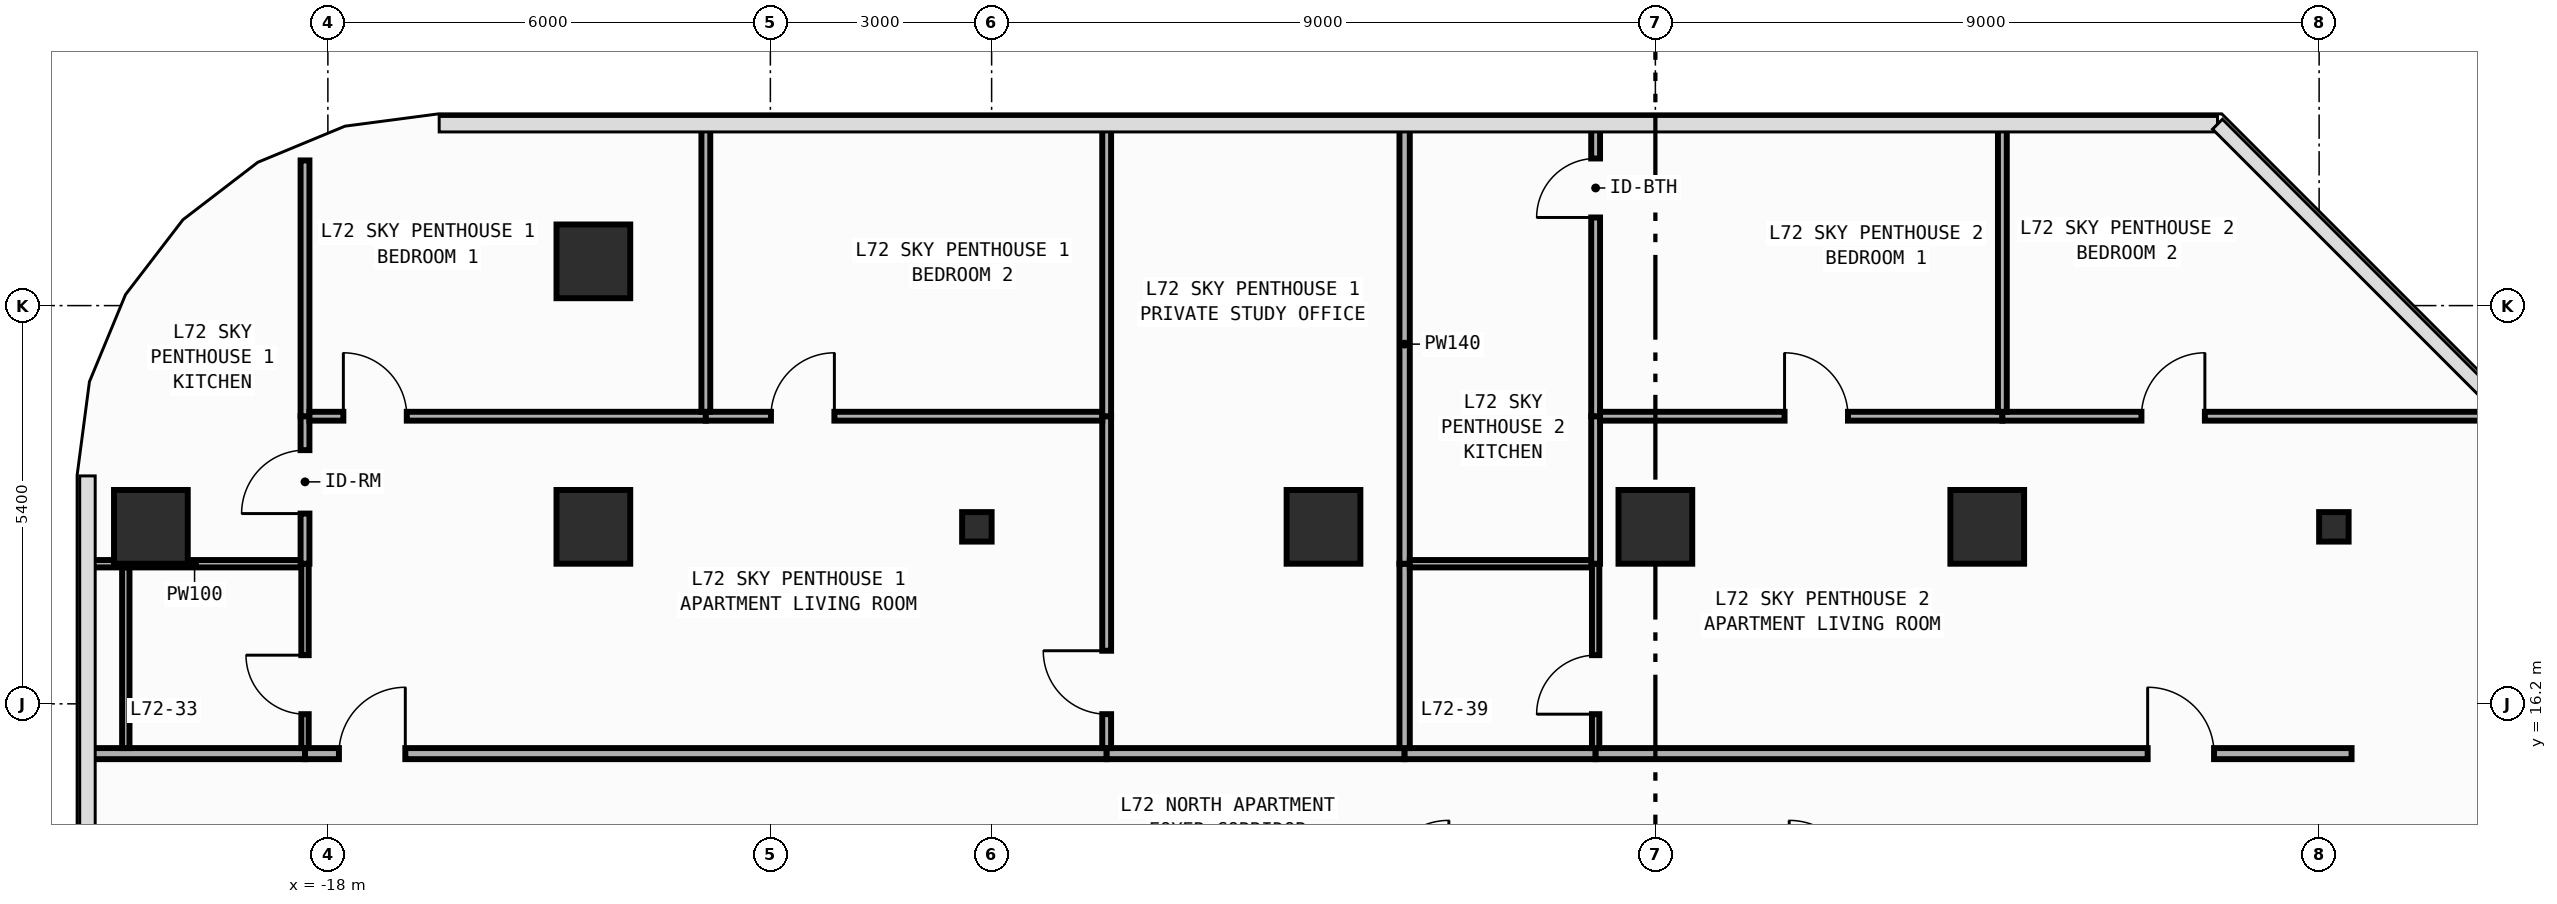
"""IFC4 building model, lengths in metres.
Left out: names, types, materials, properties, quantities, classifications, styles, units other than length and angle.
Written with IfcOpenShell. Run it as: python <this file> out.ifc"""

import sys

from ifc_helpers import new_model, si_unit, direction, frame, frame_2d, origin, origin_2d, place, context, subcontext, project, spatial, rectangle, circle, i_section, extrude, element, fill, save


model = new_model("IFC4")
c1 = context("Model", 3, precision=1e-05, world=origin(), true_north=direction((0.0, 1.0)))
c2 = subcontext(c1, "Body", "Model", "MODEL_VIEW")
j1 = project(units=[si_unit("LENGTHUNIT", "METRE"), si_unit("PLANEANGLEUNIT", "RADIAN")], contexts=[c1])
p1 = place(None, origin())
s1 = spatial("IfcSite", under=j1, at=p1, CompositionType="ELEMENT")
p2 = place(p1, origin())
s2 = spatial("IfcBuilding", under=s1, at=p2, CompositionType="ELEMENT")
p3 = place(p2, frame((0.0, 0.0, 300.4)))
s3 = spatial("IfcBuildingStorey", under=s2, at=p3, CompositionType="ELEMENT", Elevation=300.4)
for number, where, z_axis, x_axis in (
    (1, (-9.2, 18.6, 0.0), (0.0, 0.0, 1.0), (1.0, 0.0, 0.0)),
    (2, (9.2, 18.6, 0.0), (0.0, 0.0, 1.0), (1.0, 0.0, 0.0)),
):
    element("IfcColumn", number, at=place(p3, frame(where, z_axis=z_axis, x_axis=x_axis)), inside=s3, PredefinedType="COLUMN", context=c2, shape_type="SweptSolid", body=[
        extrude(i_section(OverallWidth=0.4, OverallDepth=0.4, WebThickness=0.013, FlangeThickness=0.021, FilletRadius=0.022, at=origin_2d()), origin(), (0.0, 0.0, 1.0), 3.8),
    ])
for number, where, z_axis, x_axis in (
    (3, (-20.4, 18.6, 0.0), (0.0, 0.0, 1.0), (1.0, 0.0, 0.0)),
    (4, (-14.4, 18.6, 0.0), (0.0, 0.0, 1.0), (1.0, 0.0, 0.0)),
    (5, (-4.5, 18.6, 0.0), (0.0, 0.0, 1.0), (1.0, 0.0, 0.0)),
    (6, (0.0, 18.6, 0.0), (0.0, 0.0, 1.0), (1.0, 0.0, 0.0)),
    (7, (4.5, 18.6, 0.0), (0.0, 0.0, 1.0), (1.0, 0.0, 0.0)),
    (8, (-14.4, 22.2, 0.0), (0.0, 0.0, 1.0), (1.0, 0.0, 0.0)),
):
    element("IfcColumn", number, at=place(p3, frame(where, z_axis=z_axis, x_axis=x_axis)), inside=s3, PredefinedType="COLUMN", context=c2, shape_type="SweptSolid", body=[
        extrude(circle(Radius=0.5, at=origin_2d()), origin(), (0.0, 0.0, 1.0), 3.8),
    ])
p4 = place(p3, frame((-21.255, 15.525, 0.0), z_axis=(0.0, 0.0, 1.0), x_axis=(1.0, 0.0, 0.0)))
e9 = element("IfcWall", 9, at=p4, inside=s3, PredefinedType="PARTITIONING", context=c2, shape_type="SweptSolid", body=[
    extrude(rectangle(XDim=2.945, YDim=0.15, at=frame_2d((1.472, 0.0))), origin(), (0.0, 0.0, 1.0), 3.54),
])
p5 = place(p3, frame((-18.31, 15.525, 0.0), z_axis=(0.0, 0.0, 1.0), x_axis=(1.0, 0.0, 0.0)))
e10 = element("IfcWall", 10, at=p5, inside=s3, PredefinedType="PARTITIONING", context=c2, shape_type="SweptSolid", body=[
    extrude(rectangle(XDim=10.87, YDim=0.15, at=frame_2d((5.435, 0.0))), origin(), (0.0, 0.0, 1.0), 3.54),
])
p6 = place(p5, frame((0.46, 0.0, 0.0)))
e11 = element("IfcOpeningElement", 11, at=p6, cuts=e10, PredefinedType="OPENING", context=c2, shape_type="SweptSolid", body=[
    extrude(rectangle(XDim=0.9, YDim=2.15, at=frame_2d((0.45, 1.075))), frame((0.0, 0.085, 0.0), z_axis=(0.0, -1.0, 0.0), x_axis=(1.0, 0.0, 0.0)), (0.0, 0.0, 1.0), 0.17),
])
p7 = place(p3, frame((-7.44, 15.525, 0.0), z_axis=(0.0, 0.0, 1.0), x_axis=(1.0, 0.0, 0.0)))
e12 = element("IfcWall", 12, at=p7, inside=s3, PredefinedType="PARTITIONING", context=c2, shape_type="SweptSolid", body=[
    extrude(rectangle(XDim=4.04, YDim=0.15, at=frame_2d((2.02, 0.0))), origin(), (0.0, 0.0, 1.0), 3.54),
])
p8 = place(p3, frame((-3.4, 15.525, 0.0), z_axis=(0.0, 0.0, 1.0), x_axis=(1.0, 0.0, 0.0)))
e13 = element("IfcWall", 13, at=p8, inside=s3, PredefinedType="PARTITIONING", context=c2, shape_type="SweptSolid", body=[
    extrude(rectangle(XDim=2.59, YDim=0.15, at=frame_2d((1.295, 0.0))), origin(), (0.0, 0.0, 1.0), 3.54),
])
p9 = place(p3, frame((-0.81, 15.525, 0.0), z_axis=(0.0, 0.0, 1.0), x_axis=(1.0, 0.0, 0.0)))
e14 = element("IfcWall", 14, at=p9, inside=s3, PredefinedType="PARTITIONING", context=c2, shape_type="SweptSolid", body=[
    extrude(rectangle(XDim=10.25, YDim=0.15, at=frame_2d((5.125, 0.0))), origin(), (0.0, 0.0, 1.0), 3.54),
])
p10 = place(p9, frame((7.485, 0.0, 0.0)))
e15 = element("IfcOpeningElement", 15, at=p10, cuts=e14, PredefinedType="OPENING", context=c2, shape_type="SweptSolid", body=[
    extrude(rectangle(XDim=0.9, YDim=2.15, at=frame_2d((0.45, 1.075))), frame((0.0, 0.085, 0.0), z_axis=(0.0, -1.0, 0.0), x_axis=(1.0, 0.0, 0.0)), (0.0, 0.0, 1.0), 0.17),
])
p11 = place(p3, frame((-21.255, 18.1, 0.0), z_axis=(0.0, 0.0, 1.0), x_axis=(1.0, 0.0, 0.0)))
e16 = element("IfcWall", 16, at=p11, inside=s3, PredefinedType="PARTITIONING", context=c2, shape_type="SweptSolid", body=[
    extrude(rectangle(XDim=2.895, YDim=0.1, at=frame_2d((1.447, 0.0))), origin(), (0.0, 0.0, 1.0), 3.54),
])
p12 = place(p3, frame((-18.31, 15.6, 0.0), z_axis=(0.0, 0.0, 1.0), x_axis=(0.0, 1.0, 0.0)))
e17 = element("IfcWall", 17, at=p12, inside=s3, PredefinedType="PARTITIONING", context=c2, shape_type="SweptSolid", body=[
    extrude(rectangle(XDim=2.5, YDim=0.1, at=frame_2d((1.25, 0.0))), origin(), (0.0, 0.0, 1.0), 3.54),
])
p13 = place(p12, frame((0.46, 0.0, 0.0)))
e18 = element("IfcOpeningElement", 18, at=p13, cuts=e17, PredefinedType="OPENING", context=c2, shape_type="SweptSolid", body=[
    extrude(rectangle(XDim=0.8, YDim=2.1, at=frame_2d((0.4, 1.05))), frame((0.0, 0.06, 0.0), z_axis=(0.0, -1.0, 0.0), x_axis=(1.0, 0.0, 0.0)), (0.0, 0.0, 1.0), 0.12),
])
p14 = place(p3, frame((-18.31, 18.1, 0.0), z_axis=(0.0, 0.0, 1.0), x_axis=(0.0, 1.0, 0.0)))
e19 = element("IfcWall", 19, at=p14, inside=s3, PredefinedType="PARTITIONING", context=c2, shape_type="SweptSolid", body=[
    extrude(rectangle(XDim=2.0, YDim=0.12, at=frame_2d((1.0, 0.0))), origin(), (0.0, 0.0, 1.0), 3.54),
])
p15 = place(p14, frame((0.68, 0.0, 0.0)))
e20 = element("IfcOpeningElement", 20, at=p15, cuts=e19, PredefinedType="OPENING", context=c2, shape_type="SweptSolid", body=[
    extrude(rectangle(XDim=0.86, YDim=2.15, at=frame_2d((0.43, 1.075))), frame((0.0, 0.07, 0.0), z_axis=(0.0, -1.0, 0.0), x_axis=(1.0, 0.0, 0.0)), (0.0, 0.0, 1.0), 0.14),
])
p16 = place(p3, frame((-18.31, 20.1, 0.0), z_axis=(0.0, 0.0, 1.0), x_axis=(0.0, 1.0, 0.0)))
e21 = element("IfcWall", 21, at=p16, inside=s3, PredefinedType="PARTITIONING", context=c2, shape_type="SweptSolid", body=[
    extrude(rectangle(XDim=3.469, YDim=0.12, at=frame_2d((1.734, 0.0))), origin(), (0.0, 0.0, 1.0), 3.54),
])
p17 = place(p3, frame((-7.44, 15.6, 0.0), z_axis=(0.0, 0.0, 1.0), x_axis=(0.0, 1.0, 0.0)))
e22 = element("IfcWall", 22, at=p17, inside=s3, PredefinedType="PARTITIONING", context=c2, shape_type="SweptSolid", body=[
    extrude(rectangle(XDim=4.5, YDim=0.12, at=frame_2d((2.25, 0.0))), origin(), (0.0, 0.0, 1.0), 3.54),
])
p18 = place(p17, frame((0.46, 0.0, 0.0)))
e23 = element("IfcOpeningElement", 23, at=p18, cuts=e22, PredefinedType="OPENING", context=c2, shape_type="SweptSolid", body=[
    extrude(rectangle(XDim=0.86, YDim=2.15, at=frame_2d((0.43, 1.075))), frame((0.0, 0.07, 0.0), z_axis=(0.0, -1.0, 0.0), x_axis=(1.0, 0.0, 0.0)), (0.0, 0.0, 1.0), 0.14),
])
p19 = place(p3, frame((-18.25, 20.1, 0.0), z_axis=(0.0, 0.0, 1.0), x_axis=(1.0, 0.0, 0.0)))
e24 = element("IfcWall", 24, at=p19, inside=s3, PredefinedType="PARTITIONING", context=c2, shape_type="SweptSolid", body=[
    extrude(rectangle(XDim=5.375, YDim=0.12, at=frame_2d((2.688, 0.0))), origin(), (0.0, 0.0, 1.0), 3.54),
])
p20 = place(p19, frame((0.46, 0.0, 0.0)))
e25 = element("IfcOpeningElement", 25, at=p20, cuts=e24, PredefinedType="OPENING", context=c2, shape_type="SweptSolid", body=[
    extrude(rectangle(XDim=0.86, YDim=2.15, at=frame_2d((0.43, 1.075))), frame((0.0, 0.07, 0.0), z_axis=(0.0, -1.0, 0.0), x_axis=(1.0, 0.0, 0.0)), (0.0, 0.0, 1.0), 0.14),
])
p21 = place(p3, frame((-12.875, 20.1, 0.0), z_axis=(0.0, 0.0, 1.0), x_axis=(1.0, 0.0, 0.0)))
e26 = element("IfcWall", 26, at=p21, inside=s3, PredefinedType="PARTITIONING", context=c2, shape_type="SweptSolid", body=[
    extrude(rectangle(XDim=5.375, YDim=0.12, at=frame_2d((2.688, 0.0))), origin(), (0.0, 0.0, 1.0), 3.54),
])
p22 = place(p21, frame((0.883, 0.0, 0.0)))
e27 = element("IfcOpeningElement", 27, at=p22, cuts=e26, PredefinedType="OPENING", context=c2, shape_type="SweptSolid", body=[
    extrude(rectangle(XDim=0.86, YDim=2.15, at=frame_2d((0.43, 1.075))), frame((0.0, 0.07, 0.0), z_axis=(0.0, -1.0, 0.0), x_axis=(1.0, 0.0, 0.0)), (0.0, 0.0, 1.0), 0.14),
])
p23 = place(p3, frame((-7.44, 20.1, 0.0), z_axis=(0.0, 0.0, 1.0), x_axis=(0.0, 1.0, 0.0)))
e28 = element("IfcWall", 28, at=p23, inside=s3, PredefinedType="PARTITIONING", context=c2, shape_type="SweptSolid", body=[
    extrude(rectangle(XDim=3.955, YDim=0.12, at=frame_2d((1.978, 0.0))), origin(), (0.0, 0.0, 1.0), 3.54),
])
p24 = place(p3, frame((-3.4, 15.6, 0.0), z_axis=(0.0, 0.0, 1.0), x_axis=(0.0, 1.0, 0.0)))
e29 = element("IfcWall", 29, at=p24, inside=s3, PredefinedType="PARTITIONING", context=c2, shape_type="SweptSolid", body=[
    extrude(rectangle(XDim=2.5, YDim=0.14, at=frame_2d((1.25, 0.0))), origin(), (0.0, 0.0, 1.0), 3.54),
])
p25 = place(p3, frame((-3.4, 18.1, 0.0), z_axis=(0.0, 0.0, 1.0), x_axis=(0.0, 1.0, 0.0)))
e30 = element("IfcWall", 30, at=p25, inside=s3, PredefinedType="PARTITIONING", context=c2, shape_type="SweptSolid", body=[
    extrude(rectangle(XDim=5.955, YDim=0.14, at=frame_2d((2.978, 0.0))), origin(), (0.0, 0.0, 1.0), 3.54),
])
p26 = place(p3, frame((-12.875, 20.16, 0.0), z_axis=(0.0, 0.0, 1.0), x_axis=(0.0, 1.0, 0.0)))
e31 = element("IfcWall", 31, at=p26, inside=s3, PredefinedType="PARTITIONING", context=c2, shape_type="SweptSolid", body=[
    extrude(rectangle(XDim=3.895, YDim=0.12, at=frame_2d((1.948, 0.0))), origin(), (0.0, 0.0, 1.0), 3.54),
])
p27 = place(p3, frame((-3.33, 18.1, 0.0), z_axis=(0.0, 0.0, 1.0), x_axis=(1.0, 0.0, 0.0)))
e32 = element("IfcWall", 32, at=p27, inside=s3, PredefinedType="PARTITIONING", context=c2, shape_type="SweptSolid", body=[
    extrude(rectangle(XDim=2.47, YDim=0.1, at=frame_2d((1.235, 0.0))), origin(), (0.0, 0.0, 1.0), 3.54),
])
p28 = place(p3, frame((-0.81, 15.6, 0.0), z_axis=(0.0, 0.0, 1.0), x_axis=(0.0, 1.0, 0.0)))
e33 = element("IfcWall", 33, at=p28, inside=s3, PredefinedType="PARTITIONING", context=c2, shape_type="SweptSolid", body=[
    extrude(rectangle(XDim=2.5, YDim=0.1, at=frame_2d((1.25, 0.0))), origin(), (0.0, 0.0, 1.0), 3.54),
])
p29 = place(p28, frame((0.46, 0.0, 0.0)))
e34 = element("IfcOpeningElement", 34, at=p29, cuts=e33, PredefinedType="OPENING", context=c2, shape_type="SweptSolid", body=[
    extrude(rectangle(XDim=0.8, YDim=2.1, at=frame_2d((0.4, 1.05))), frame((0.0, 0.06, 0.0), z_axis=(0.0, -1.0, 0.0), x_axis=(1.0, 0.0, 0.0)), (0.0, 0.0, 1.0), 0.12),
])
p30 = place(p3, frame((-0.81, 18.1, 0.0), z_axis=(0.0, 0.0, 1.0), x_axis=(0.0, 1.0, 0.0)))
e35 = element("IfcWall", 35, at=p30, inside=s3, PredefinedType="PARTITIONING", context=c2, shape_type="SweptSolid", body=[
    extrude(rectangle(XDim=2.0, YDim=0.12, at=frame_2d((1.0, 0.0))), origin(), (0.0, 0.0, 1.0), 3.54),
])
p31 = place(p3, frame((-0.81, 20.1, 0.0), z_axis=(0.0, 0.0, 1.0), x_axis=(0.0, 1.0, 0.0)))
e36 = element("IfcWall", 36, at=p31, inside=s3, PredefinedType="PARTITIONING", context=c2, shape_type="SweptSolid", body=[
    extrude(rectangle(XDim=3.955, YDim=0.12, at=frame_2d((1.978, 0.0))), origin(), (0.0, 0.0, 1.0), 3.54),
])
p32 = place(p31, frame((2.695, 0.0, 0.0)))
e37 = element("IfcOpeningElement", 37, at=p32, cuts=e36, PredefinedType="OPENING", context=c2, shape_type="SweptSolid", body=[
    extrude(rectangle(XDim=0.8, YDim=2.1, at=frame_2d((0.4, 1.05))), frame((0.0, 0.07, 0.0), z_axis=(0.0, -1.0, 0.0), x_axis=(1.0, 0.0, 0.0)), (0.0, 0.0, 1.0), 0.14),
])
p33 = place(p3, frame((-0.75, 20.1, 0.0), z_axis=(0.0, 0.0, 1.0), x_axis=(1.0, 0.0, 0.0)))
e38 = element("IfcWall", 38, at=p33, inside=s3, PredefinedType="PARTITIONING", context=c2, shape_type="SweptSolid", body=[
    extrude(rectangle(XDim=5.455, YDim=0.12, at=frame_2d((2.728, 0.0))), origin(), (0.0, 0.0, 1.0), 3.54),
])
p34 = place(p33, frame((2.502, 0.0, 0.0)))
e39 = element("IfcOpeningElement", 39, at=p34, cuts=e38, PredefinedType="OPENING", context=c2, shape_type="SweptSolid", body=[
    extrude(rectangle(XDim=0.86, YDim=2.15, at=frame_2d((0.43, 1.075))), frame((0.0, 0.07, 0.0), z_axis=(0.0, -1.0, 0.0), x_axis=(1.0, 0.0, 0.0)), (0.0, 0.0, 1.0), 0.14),
])
p35 = place(p3, frame((4.705, 20.1, 0.0), z_axis=(0.0, 0.0, 1.0), x_axis=(1.0, 0.0, 0.0)))
e40 = element("IfcWall", 40, at=p35, inside=s3, PredefinedType="PARTITIONING", context=c2, shape_type="SweptSolid", body=[
    extrude(rectangle(XDim=6.872, YDim=0.12, at=frame_2d((3.436, 0.0))), origin(), (0.0, 0.0, 1.0), 3.54),
])
p36 = place(p35, frame((1.886, 0.0, 0.0)))
e41 = element("IfcOpeningElement", 41, at=p36, cuts=e40, PredefinedType="OPENING", context=c2, shape_type="SweptSolid", body=[
    extrude(rectangle(XDim=0.86, YDim=2.15, at=frame_2d((0.43, 1.075))), frame((0.0, 0.07, 0.0), z_axis=(0.0, -1.0, 0.0), x_axis=(1.0, 0.0, 0.0)), (0.0, 0.0, 1.0), 0.14),
])
p37 = place(p3, frame((4.705, 20.16, 0.0), z_axis=(0.0, 0.0, 1.0), x_axis=(0.0, 1.0, 0.0)))
e42 = element("IfcWall", 42, at=p37, inside=s3, PredefinedType="PARTITIONING", context=c2, shape_type="SweptSolid", body=[
    extrude(rectangle(XDim=3.895, YDim=0.12, at=frame_2d((1.948, 0.0))), origin(), (0.0, 0.0, 1.0), 3.54),
])
p38 = place(p3, frame((-20.74, 15.6, 0.0), z_axis=(0.0, 0.0, 1.0), x_axis=(0.0, 1.0, 0.0)))
e43 = element("IfcWall", 43, at=p38, inside=s3, PredefinedType="PARTITIONING", context=c2, shape_type="SweptSolid", body=[
    extrude(rectangle(XDim=2.45, YDim=0.1, at=frame_2d((1.225, 0.0))), origin(), (0.0, 0.0, 1.0), 3.54),
])
p39 = place(p6, origin())
e44 = element("IfcDoor", 44, at=p39, inside=s3, OperationType="SINGLE_SWING_RIGHT", PredefinedType="DOOR", context=c2, shape_type="SweptSolid", body=[
    extrude(rectangle(XDim=0.9, YDim=2.15, at=frame_2d((0.45, 1.075))), frame((0.0, 0.025, 0.0), z_axis=(0.0, -1.0, 0.0), x_axis=(1.0, 0.0, 0.0)), (0.0, 0.0, 1.0), 0.05),
])
fill(e11, e44)
p40 = place(p10, origin())
e45 = element("IfcDoor", 45, at=p40, inside=s3, OperationType="SINGLE_SWING_LEFT", PredefinedType="DOOR", context=c2, shape_type="SweptSolid", body=[
    extrude(rectangle(XDim=0.9, YDim=2.15, at=frame_2d((0.45, 1.075))), frame((0.0, 0.025, 0.0), z_axis=(0.0, -1.0, 0.0), x_axis=(1.0, 0.0, 0.0)), (0.0, 0.0, 1.0), 0.05),
])
fill(e15, e45)
p41 = place(p13, origin())
e46 = element("IfcDoor", 46, at=p41, inside=s3, OperationType="SINGLE_SWING_RIGHT", PredefinedType="DOOR", context=c2, shape_type="SweptSolid", body=[
    extrude(rectangle(XDim=0.8, YDim=2.1, at=frame_2d((0.4, 1.05))), frame((0.0, 0.025, 0.0), z_axis=(0.0, -1.0, 0.0), x_axis=(1.0, 0.0, 0.0)), (0.0, 0.0, 1.0), 0.05),
])
fill(e18, e46)
p42 = place(p15, origin())
e47 = element("IfcDoor", 47, at=p42, inside=s3, OperationType="SINGLE_SWING_LEFT", PredefinedType="DOOR", context=c2, shape_type="SweptSolid", body=[
    extrude(rectangle(XDim=0.86, YDim=2.15, at=frame_2d((0.43, 1.075))), frame((0.0, 0.025, 0.0), z_axis=(0.0, -1.0, 0.0), x_axis=(1.0, 0.0, 0.0)), (0.0, 0.0, 1.0), 0.05),
])
fill(e20, e47)
p43 = place(p18, origin())
e48 = element("IfcDoor", 48, at=p43, inside=s3, OperationType="SINGLE_SWING_RIGHT", PredefinedType="DOOR", context=c2, shape_type="SweptSolid", body=[
    extrude(rectangle(XDim=0.86, YDim=2.15, at=frame_2d((0.43, 1.075))), frame((0.0, 0.025, 0.0), z_axis=(0.0, -1.0, 0.0), x_axis=(1.0, 0.0, 0.0)), (0.0, 0.0, 1.0), 0.05),
])
fill(e23, e48)
p44 = place(p20, origin())
e49 = element("IfcDoor", 49, at=p44, inside=s3, OperationType="SINGLE_SWING_LEFT", PredefinedType="DOOR", context=c2, shape_type="SweptSolid", body=[
    extrude(rectangle(XDim=0.86, YDim=2.15, at=frame_2d((0.43, 1.075))), frame((0.0, 0.025, 0.0), z_axis=(0.0, -1.0, 0.0), x_axis=(1.0, 0.0, 0.0)), (0.0, 0.0, 1.0), 0.05),
])
fill(e25, e49)
p45 = place(p22, origin())
e50 = element("IfcDoor", 50, at=p45, inside=s3, OperationType="SINGLE_SWING_RIGHT", PredefinedType="DOOR", context=c2, shape_type="SweptSolid", body=[
    extrude(rectangle(XDim=0.86, YDim=2.15, at=frame_2d((0.43, 1.075))), frame((0.0, 0.025, 0.0), z_axis=(0.0, -1.0, 0.0), x_axis=(1.0, 0.0, 0.0)), (0.0, 0.0, 1.0), 0.05),
])
fill(e27, e50)
p46 = place(p29, origin())
e51 = element("IfcDoor", 51, at=p46, inside=s3, OperationType="SINGLE_SWING_LEFT", PredefinedType="DOOR", context=c2, shape_type="SweptSolid", body=[
    extrude(rectangle(XDim=0.8, YDim=2.1, at=frame_2d((0.4, 1.05))), frame((0.0, 0.025, 0.0), z_axis=(0.0, -1.0, 0.0), x_axis=(1.0, 0.0, 0.0)), (0.0, 0.0, 1.0), 0.05),
])
fill(e34, e51)
p47 = place(p34, origin())
e52 = element("IfcDoor", 52, at=p47, inside=s3, OperationType="SINGLE_SWING_LEFT", PredefinedType="DOOR", context=c2, shape_type="SweptSolid", body=[
    extrude(rectangle(XDim=0.86, YDim=2.15, at=frame_2d((0.43, 1.075))), frame((0.0, 0.025, 0.0), z_axis=(0.0, -1.0, 0.0), x_axis=(1.0, 0.0, 0.0)), (0.0, 0.0, 1.0), 0.05),
])
fill(e39, e52)
p48 = place(p36, origin())
e53 = element("IfcDoor", 53, at=p48, inside=s3, OperationType="SINGLE_SWING_RIGHT", PredefinedType="DOOR", context=c2, shape_type="SweptSolid", body=[
    extrude(rectangle(XDim=0.86, YDim=2.15, at=frame_2d((0.43, 1.075))), frame((0.0, 0.025, 0.0), z_axis=(0.0, -1.0, 0.0), x_axis=(1.0, 0.0, 0.0)), (0.0, 0.0, 1.0), 0.05),
])
fill(e41, e53)
p49 = place(p32, origin())
e54 = element("IfcDoor", 54, at=p49, inside=s3, OperationType="SINGLE_SWING_LEFT", PredefinedType="DOOR", context=c2, shape_type="SweptSolid", body=[
    extrude(rectangle(XDim=0.8, YDim=2.1, at=frame_2d((0.4, 1.05))), frame((0.0, 0.025, 0.0), z_axis=(0.0, -1.0, 0.0), x_axis=(1.0, 0.0, 0.0)), (0.0, 0.0, 1.0), 0.05),
])
fill(e37, e54)
save(model, sys.argv[1])
